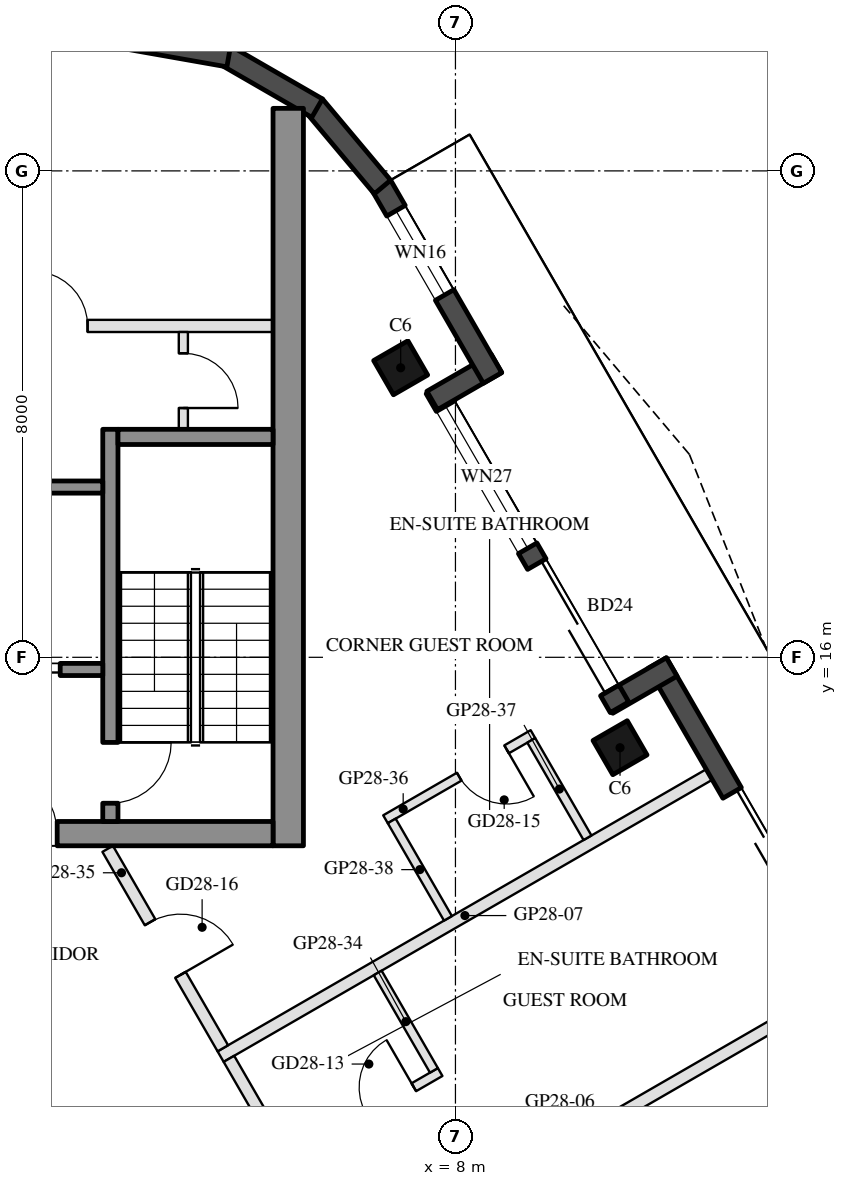
"""IFC4 building model, lengths in metres.
Left out: names, types, materials, properties, quantities, classifications, styles, units other than length and angle.
Written with IfcOpenShell. Run it as: python <this file> out.ifc"""

import sys

from ifc_helpers import new_model, si_unit, direction, frame, frame_2d, origin, origin_2d, place, context, subcontext, project, spatial, rectangle, hollow_rectangle, extrude, boolean, halfspace, element, fill, save


model = new_model("IFC4")
c1 = context("Model", 3, precision=1e-05, world=origin(), true_north=direction((0.0, 1.0)))
c2 = subcontext(c1, "Body", "Model", "MODEL_VIEW")
j1 = project(units=[si_unit("LENGTHUNIT", "METRE"), si_unit("PLANEANGLEUNIT", "RADIAN")], contexts=[c1])
p1 = place(None, origin())
s1 = spatial("IfcSite", under=j1, at=p1, CompositionType="ELEMENT")
p2 = place(p1, origin())
s2 = spatial("IfcBuilding", under=s1, at=p2, CompositionType="ELEMENT")
p3 = place(p2, frame((0.0, 0.0, 280.0)))
s3 = spatial("IfcBuildingStorey", under=s2, at=p3, CompositionType="ELEMENT", Elevation=280.0)
p4 = place(p3, frame((10.707, 14.513, 0.0), z_axis=(0.0, 0.0, 1.0), x_axis=(-0.5, 0.866025403784, 0.0)))
e1 = element("IfcColumn", 1, at=p4, inside=s3, PredefinedType="COLUMN", context=c2, shape_type="SweptSolid", body=[
    boolean("DIFFERENCE", extrude(hollow_rectangle(XDim=0.65, YDim=0.65, WallThickness=0.03, at=origin_2d()), origin(), (0.0, 0.0, 1.0), 3.7), halfspace(frame((0.0, 0.0, 0.04), z_axis=(0.0, 0.0, 1.0), x_axis=(1.0, 0.0, 0.0)), True)),
])
p5 = place(p3, frame((7.099, 20.762, 0.0), z_axis=(0.0, 0.0, 1.0), x_axis=(-0.5, 0.866025403784, 0.0)))
e2 = element("IfcColumn", 2, at=p5, inside=s3, PredefinedType="COLUMN", context=c2, shape_type="SweptSolid", body=[
    boolean("DIFFERENCE", extrude(hollow_rectangle(XDim=0.65, YDim=0.65, WallThickness=0.03, at=origin_2d()), origin(), (0.0, 0.0, 1.0), 3.7), halfspace(frame((0.0, 0.0, 0.047), z_axis=(0.0, 0.0, 1.0), x_axis=(1.0, 0.0, 0.0)), True)),
])
p6 = place(p3, frame((15.825, 8.097, 0.0), z_axis=(0.0, 0.0, 1.0), x_axis=(-0.500006872736, 0.866021435772, 0.0)))
e3 = element("IfcWall", 3, at=p6, inside=s3, PredefinedType="SOLIDWALL", context=c2, shape_type="SweptSolid", body=[
    extrude(rectangle(XDim=9.015, YDim=0.35, at=frame_2d((4.508, 0.0))), origin(), (0.0, 0.0, 1.0), 3.55),
])
p7 = place(p6, frame((1.575, 0.0, 0.3)))
e4 = element("IfcOpeningElement", 4, at=p7, cuts=e3, PredefinedType="OPENING", context=c2, shape_type="SweptSolid", body=[
    extrude(rectangle(XDim=0.8, YDim=2.65, at=frame_2d((0.4, 1.325))), frame((0.0, 0.185, 0.0), z_axis=(0.0, -1.0, 0.0), x_axis=(1.0, 0.0, 0.0)), (0.0, 0.0, 1.0), 0.37),
])
p8 = place(p6, frame((4.75, 0.0, 0.0)))
e5 = element("IfcOpeningElement", 5, at=p8, cuts=e3, PredefinedType="OPENING", context=c2, shape_type="SweptSolid", body=[
    extrude(rectangle(XDim=1.8, YDim=2.4, at=frame_2d((0.9, 1.2))), frame((0.0, 0.185, 0.0), z_axis=(0.0, -1.0, 0.0), x_axis=(1.0, 0.0, 0.0)), (0.0, 0.0, 1.0), 0.37),
])
p9 = place(p6, frame((3.35, 0.0, 0.3)))
e6 = element("IfcOpeningElement", 6, at=p9, cuts=e3, PredefinedType="OPENING", context=c2, shape_type="SweptSolid", body=[
    extrude(rectangle(XDim=1.0, YDim=2.65, at=frame_2d((0.5, 1.325))), frame((0.0, 0.185, 0.0), z_axis=(0.0, -1.0, 0.0), x_axis=(1.0, 0.0, 0.0)), (0.0, 0.0, 1.0), 0.37),
])
p10 = place(p3, frame((11.557, 15.841, 0.0), z_axis=(0.0, 0.0, 1.0), x_axis=(-0.866005645448, -0.500034220881, 0.0)))
e7 = element("IfcWall", 7, at=p10, inside=s3, PredefinedType="SOLIDWALL", context=c2, shape_type="SweptSolid", body=[
    extrude(rectangle(XDim=1.22, YDim=0.35, at=frame_2d((0.61, 0.0))), origin(), (0.0, 0.0, 1.0), 3.55),
])
p11 = place(p3, frame((10.698, 15.178, 0.0), z_axis=(0.0, 0.0, 1.0), x_axis=(-0.499985371027, 0.866033849661, 0.0)))
e8 = element("IfcWall", 8, at=p11, inside=s3, PredefinedType="SOLIDWALL", context=c2, shape_type="SweptSolid", body=[
    extrude(rectangle(XDim=6.055, YDim=0.35, at=frame_2d((3.028, 0.0))), origin(), (0.0, 0.0, 1.0), 3.55),
])
p12 = place(p11, frame((0.32, 0.0, 0.0)))
e9 = element("IfcOpeningElement", 9, at=p12, cuts=e8, PredefinedType="OPENING", context=c2, shape_type="SweptSolid", body=[
    extrude(rectangle(XDim=2.4, YDim=2.4, at=frame_2d((1.2, 1.2))), frame((0.0, 0.185, 0.0), z_axis=(0.0, -1.0, 0.0), x_axis=(1.0, 0.0, 0.0)), (0.0, 0.0, 1.0), 0.37),
])
p13 = place(p11, frame((3.02, 0.0, 0.3)))
e10 = element("IfcOpeningElement", 10, at=p13, cuts=e8, PredefinedType="OPENING", context=c2, shape_type="SweptSolid", body=[
    extrude(rectangle(XDim=2.7, YDim=2.65, at=frame_2d((1.35, 1.325))), frame((0.0, 0.185, 0.0), z_axis=(0.0, -1.0, 0.0), x_axis=(1.0, 0.0, 0.0)), (0.0, 0.0, 1.0), 0.37),
])
p14 = place(p3, frame((7.617, 20.224, 0.0), z_axis=(0.0, 0.0, 1.0), x_axis=(0.866005645448, 0.500034220881, 0.0)))
e11 = element("IfcWall", 11, at=p14, inside=s3, PredefinedType="SOLIDWALL", context=c2, shape_type="SweptSolid", body=[
    extrude(rectangle(XDim=1.22, YDim=0.35, at=frame_2d((0.61, 0.0))), origin(), (0.0, 0.0, 1.0), 3.55),
])
p15 = place(p3, frame((8.61, 20.595, 0.0), z_axis=(0.0, 0.0, 1.0), x_axis=(-0.499990402704, 0.866030944715, 0.0)))
e12 = element("IfcWall", 12, at=p15, inside=s3, PredefinedType="SOLIDWALL", context=c2, shape_type="SweptSolid", body=[
    extrude(rectangle(XDim=3.654, YDim=0.35, at=frame_2d((1.827, 0.0))), origin(), (0.0, 0.0, 1.0), 3.55),
])
p16 = place(p15, frame((1.575, 0.0, 0.3)))
e13 = element("IfcOpeningElement", 13, at=p16, cuts=e12, PredefinedType="OPENING", context=c2, shape_type="SweptSolid", body=[
    extrude(rectangle(XDim=1.6, YDim=2.65, at=frame_2d((0.8, 1.325))), frame((0.0, 0.185, 0.0), z_axis=(0.0, -1.0, 0.0), x_axis=(1.0, 0.0, 0.0)), (0.0, 0.0, 1.0), 0.37),
])
for number, where, z_axis, x_axis in (
    (14, (6.8, 23.735, 0.0), (0.0, 0.0, 1.0), (-0.643, 0.766, 0.0)),
    (15, (5.725, 25.032, 0.0), (0.0, 0.0, 1.0), (-0.866, 0.5, 0.0)),
    (16, (4.271, 25.884, 0.0), (0.0, 0.0, 1.0), (-0.985, 0.174, 0.0)),
):
    element("IfcWall", number, at=place(p3, frame(where, z_axis=z_axis, x_axis=x_axis)), inside=s3, PredefinedType="SOLIDWALL", context=c2, shape_type="SweptSolid", body=[
        extrude(rectangle(XDim=1.745, YDim=0.35, at=frame_2d((0.872, 0.0))), origin(), (0.0, 0.0, 1.0), 3.55),
    ])
p17 = place(p3, frame((5.25, 12.9, 0.0), z_axis=(0.0, 0.0, 1.0), x_axis=(0.0, 1.0, 0.0)))
e17 = element("IfcWall", 17, at=p17, inside=s3, PredefinedType="SHEAR", context=c2, shape_type="SweptSolid", body=[
    extrude(rectangle(XDim=12.129, YDim=0.5, at=frame_2d((6.064, 0.0))), origin(), (0.0, 0.0, 1.0), 3.5),
])
p18 = place(p3, frame((5.0, 13.1, 0.0), z_axis=(0.0, 0.0, 1.0), x_axis=(-1.0, 0.0, 0.0)))
e18 = element("IfcWall", 18, at=p18, inside=s3, PredefinedType="SHEAR", context=c2, shape_type="SweptSolid", body=[
    extrude(rectangle(XDim=10.0, YDim=0.4, at=frame_2d((5.0, 0.0))), origin(), (0.0, 0.0, 1.0), 3.5),
])
p19 = place(p18, frame((3.55, 0.0, 0.0)))
e19 = element("IfcOpeningElement", 19, at=p19, cuts=e18, PredefinedType="OPENING", context=c2, shape_type="SweptSolid", body=[
    extrude(rectangle(XDim=1.1, YDim=2.1, at=frame_2d((0.55, 1.05))), frame((0.0, 0.21, 0.0), z_axis=(0.0, -1.0, 0.0), x_axis=(1.0, 0.0, 0.0)), (0.0, 0.0, 1.0), 0.42),
])
p20 = place(p18, frame((5.85, 0.0, 0.0)))
e20 = element("IfcOpeningElement", 20, at=p20, cuts=e18, PredefinedType="OPENING", context=c2, shape_type="SweptSolid", body=[
    extrude(rectangle(XDim=1.4, YDim=2.1, at=frame_2d((0.7, 1.05))), frame((0.0, 0.21, 0.0), z_axis=(0.0, -1.0, 0.0), x_axis=(1.0, 0.0, 0.0)), (0.0, 0.0, 1.0), 0.42),
])
p21 = place(p3, frame((2.325, 13.3, 0.0), z_axis=(0.0, 0.0, 1.0), x_axis=(0.0, 1.0, 0.0)))
e21 = element("IfcWall", 21, at=p21, inside=s3, PredefinedType="SHEAR", context=c2, shape_type="SweptSolid", body=[
    extrude(rectangle(XDim=6.45, YDim=0.25, at=frame_2d((3.225, 0.0))), origin(), (0.0, 0.0, 1.0), 3.5),
])
p22 = place(p21, frame((0.3, 0.0, 0.0)))
e22 = element("IfcOpeningElement", 22, at=p22, cuts=e21, PredefinedType="OPENING", context=c2, shape_type="SweptSolid", body=[
    extrude(rectangle(XDim=1.0, YDim=2.1, at=frame_2d((0.5, 1.05))), frame((0.0, 0.135, 0.0), z_axis=(0.0, -1.0, 0.0), x_axis=(1.0, 0.0, 0.0)), (0.0, 0.0, 1.0), 0.27),
])
p23 = place(p3, frame((5.0, 19.625, 0.0), z_axis=(0.0, 0.0, 1.0), x_axis=(-1.0, 0.0, 0.0)))
e23 = element("IfcWall", 23, at=p23, inside=s3, PredefinedType="SHEAR", context=c2, shape_type="SweptSolid", body=[
    extrude(rectangle(XDim=2.55, YDim=0.25, at=frame_2d((1.275, 0.0))), origin(), (0.0, 0.0, 1.0), 3.5),
])
p24 = place(p3, frame((2.2, 18.8, 0.0), z_axis=(0.0, 0.0, 1.0), x_axis=(-1.0, 0.0, 0.0)))
e24 = element("IfcWall", 24, at=p24, inside=s3, PredefinedType="SHEAR", context=c2, shape_type="SweptSolid", body=[
    extrude(rectangle(XDim=2.8, YDim=0.2, at=frame_2d((1.4, 0.0))), origin(), (0.0, 0.0, 1.0), 3.5),
])
p25 = place(p3, frame((2.2, 15.8, 0.0), z_axis=(0.0, 0.0, 1.0), x_axis=(-1.0, 0.0, 0.0)))
e25 = element("IfcWall", 25, at=p25, inside=s3, PredefinedType="SHEAR", context=c2, shape_type="SweptSolid", body=[
    extrude(rectangle(XDim=2.8, YDim=0.2, at=frame_2d((1.4, 0.0))), origin(), (0.0, 0.0, 1.0), 3.5),
])
p26 = place(p25, frame((0.7, 0.0, 0.0)))
e26 = element("IfcOpeningElement", 26, at=p26, cuts=e25, PredefinedType="OPENING", context=c2, shape_type="SweptSolid", body=[
    extrude(rectangle(XDim=1.2, YDim=2.1, at=frame_2d((0.6, 1.05))), frame((0.0, 0.11, 0.0), z_axis=(0.0, -1.0, 0.0), x_axis=(1.0, 0.0, 0.0)), (0.0, 0.0, 1.0), 0.22),
])
p27 = place(p3, frame((5.0, 21.45, 0.0), z_axis=(0.0, 0.0, 1.0), x_axis=(-1.0, 0.0, 0.0)))
e27 = element("IfcWall", 27, at=p27, inside=s3, PredefinedType="PARTITIONING", context=c2, shape_type="SweptSolid", body=[
    extrude(rectangle(XDim=5.4, YDim=0.2, at=frame_2d((2.7, 0.0))), origin(), (0.0, 0.0, 1.0), 3.5),
])
p28 = place(p27, frame((3.05, 0.0, 0.0)))
e28 = element("IfcOpeningElement", 28, at=p28, cuts=e27, PredefinedType="OPENING", context=c2, shape_type="SweptSolid", body=[
    extrude(rectangle(XDim=0.9, YDim=2.1, at=frame_2d((0.45, 1.05))), frame((0.0, 0.11, 0.0), z_axis=(0.0, -1.0, 0.0), x_axis=(1.0, 0.0, 0.0)), (0.0, 0.0, 1.0), 0.22),
])
p29 = place(p3, frame((3.525, 19.75, 0.0), z_axis=(0.0, 0.0, 1.0), x_axis=(0.0, 1.0, 0.0)))
e29 = element("IfcWall", 29, at=p29, inside=s3, PredefinedType="PARTITIONING", context=c2, shape_type="SweptSolid", body=[
    extrude(rectangle(XDim=1.6, YDim=0.15, at=frame_2d((0.8, 0.0))), origin(), (0.0, 0.0, 1.0), 3.5),
])
p30 = place(p29, frame((0.35, 0.0, 0.0)))
e30 = element("IfcOpeningElement", 30, at=p30, cuts=e29, PredefinedType="OPENING", context=c2, shape_type="SweptSolid", body=[
    extrude(rectangle(XDim=0.9, YDim=2.1, at=frame_2d((0.45, 1.05))), frame((0.0, 0.085, 0.0), z_axis=(0.0, -1.0, 0.0), x_axis=(1.0, 0.0, 0.0)), (0.0, 0.0, 1.0), 0.17),
])
p31 = place(p3, frame((14.224, 10.521, 0.0), z_axis=(0.0, 0.0, 1.0), x_axis=(-0.866024341471, -0.500001839976, 0.0)))
e31 = element("IfcWall", 31, at=p31, inside=s3, PredefinedType="PARTITIONING", context=c2, shape_type="SweptSolid", body=[
    extrude(rectangle(XDim=9.279, YDim=0.2, at=frame_2d((4.639, 0.0))), origin(), (0.0, 0.0, 1.0), 3.16),
])
p32 = place(p3, frame((12.174, 14.072, 0.0), z_axis=(0.0, 0.0, 1.0), x_axis=(-0.866035734738, -0.499982105836, 0.0)))
e32 = element("IfcWall", 32, at=p32, inside=s3, PredefinedType="PARTITIONING", context=c2, shape_type="SweptSolid", body=[
    extrude(rectangle(XDim=9.279, YDim=0.2, at=frame_2d((4.639, 0.0))), origin(), (0.0, 0.0, 1.0), 3.16),
])
p33 = place(p3, frame((4.275, 9.396, 0.0), z_axis=(0.0, 0.0, 1.0), x_axis=(0.499997012787, -0.866027128446, 0.0)))
e33 = element("IfcWall", 33, at=p33, inside=s3, PredefinedType="PARTITIONING", context=c2, shape_type="SweptSolid", body=[
    extrude(rectangle(XDim=3.9, YDim=0.2, at=frame_2d((1.95, 0.0))), origin(), (0.0, 0.0, 1.0), 3.05),
])
p34 = place(p33, frame((2.45, 0.0, 0.0)))
e34 = element("IfcOpeningElement", 34, at=p34, cuts=e33, PredefinedType="OPENING", context=c2, shape_type="SweptSolid", body=[
    extrude(rectangle(XDim=1.0, YDim=2.1, at=frame_2d((0.5, 1.05))), frame((0.0, 0.11, 0.0), z_axis=(0.0, -1.0, 0.0), x_axis=(1.0, 0.0, 0.0)), (0.0, 0.0, 1.0), 0.22),
])
p35 = place(p3, frame((5.324, 7.779, 0.0), z_axis=(0.0, 0.0, 1.0), x_axis=(0.865996816683, 0.500049511043, 0.0)))
e35 = element("IfcWall", 35, at=p35, inside=s3, PredefinedType="PARTITIONING", context=c2, shape_type="SweptSolid", body=[
    extrude(rectangle(XDim=2.8, YDim=0.15, at=frame_2d((1.4, 0.0))), origin(), (0.0, 0.0, 1.0), 3.55),
])
p36 = place(p35, frame((1.4, 0.0, 0.0)))
e36 = element("IfcOpeningElement", 36, at=p36, cuts=e35, PredefinedType="OPENING", context=c2, shape_type="SweptSolid", body=[
    extrude(rectangle(XDim=0.9, YDim=2.1, at=frame_2d((0.45, 1.05))), frame((0.0, 0.085, 0.0), z_axis=(0.0, -1.0, 0.0), x_axis=(1.0, 0.0, 0.0)), (0.0, 0.0, 1.0), 0.17),
])
p37 = place(p3, frame((7.646, 9.207, 0.0), z_axis=(0.0, 0.0, 1.0), x_axis=(-0.49994333299, 0.866058118026, 0.0)))
e37 = element("IfcWall", 37, at=p37, inside=s3, PredefinedType="PARTITIONING", context=c2, shape_type="SweptSolid", body=[
    extrude(rectangle(XDim=1.85, YDim=0.15, at=frame_2d((0.925, 0.0))), origin(), (0.0, 0.0, 1.0), 3.55),
])
p38 = place(p3, frame((2.281, 12.85, 0.0), z_axis=(0.0, 0.0, 1.0), x_axis=(0.499979074716, -0.866037484666, 0.0)))
e38 = element("IfcWall", 38, at=p38, inside=s3, PredefinedType="PARTITIONING", context=c2, shape_type="SweptSolid", body=[
    extrude(rectangle(XDim=3.788, YDim=0.2, at=frame_2d((1.894, 0.0))), origin(), (0.0, 0.0, 1.0), 3.05),
])
p39 = place(p38, frame((1.394, 0.0, 0.0)))
e39 = element("IfcOpeningElement", 39, at=p39, cuts=e38, PredefinedType="OPENING", context=c2, shape_type="SweptSolid", body=[
    extrude(rectangle(XDim=1.0, YDim=2.1, at=frame_2d((0.5, 1.05))), frame((0.0, 0.11, 0.0), z_axis=(0.0, -1.0, 0.0), x_axis=(1.0, 0.0, 0.0)), (0.0, 0.0, 1.0), 0.22),
])
p40 = place(p3, frame((9.274, 14.737, 0.0), z_axis=(0.0, 0.0, 1.0), x_axis=(-0.866018616679, -0.500011755427, 0.0)))
e40 = element("IfcWall", 40, at=p40, inside=s3, PredefinedType="PARTITIONING", context=c2, shape_type="SweptSolid", body=[
    extrude(rectangle(XDim=2.8, YDim=0.15, at=frame_2d((1.4, 0.0))), origin(), (0.0, 0.0, 1.0), 3.55),
])
p41 = place(p40, frame((0.5, 0.0, 0.0)))
e41 = element("IfcOpeningElement", 41, at=p41, cuts=e40, PredefinedType="OPENING", context=c2, shape_type="SweptSolid", body=[
    extrude(rectangle(XDim=0.9, YDim=2.1, at=frame_2d((0.45, 1.05))), frame((0.0, 0.085, 0.0), z_axis=(0.0, -1.0, 0.0), x_axis=(1.0, 0.0, 0.0)), (0.0, 0.0, 1.0), 0.17),
])
p42 = place(p3, frame((10.172, 13.032, 0.0), z_axis=(0.0, 0.0, 1.0), x_axis=(-0.500042316284, 0.866000971088, 0.0)))
e42 = element("IfcWall", 42, at=p42, inside=s3, PredefinedType="PARTITIONING", context=c2, shape_type="SweptSolid", body=[
    extrude(rectangle(XDim=1.85, YDim=0.15, at=frame_2d((0.925, 0.0))), origin(), (0.0, 0.0, 1.0), 3.05),
])
p43 = place(p3, frame((7.877, 11.707, 0.0), z_axis=(0.0, 0.0, 1.0), x_axis=(-0.499985172903, 0.866033964044, 0.0)))
e43 = element("IfcWall", 43, at=p43, inside=s3, PredefinedType="PARTITIONING", context=c2, shape_type="SweptSolid", body=[
    extrude(rectangle(XDim=1.85, YDim=0.15, at=frame_2d((0.925, 0.0))), origin(), (0.0, 0.0, 1.0), 3.05),
])
p44 = place(p8, frame((1.8, 0.0, 0.0), z_axis=(0.0, 0.0, 1.0), x_axis=(-1.0, 0.0, 0.0)))
e44 = element("IfcDoor", 44, at=p44, inside=s3, OperationType="SLIDING_TO_LEFT", PredefinedType="DOOR", context=c2, shape_type="SweptSolid", body=[
    extrude(rectangle(XDim=1.8, YDim=2.4, at=frame_2d((0.9, 1.2))), frame((0.0, 0.025, 0.0), z_axis=(0.0, -1.0, 0.0), x_axis=(1.0, 0.0, 0.0)), (0.0, 0.0, 1.0), 0.05),
])
fill(e5, e44)
p45 = place(p12, frame((2.4, 0.0, 0.0), z_axis=(0.0, 0.0, 1.0), x_axis=(-1.0, 0.0, 0.0)))
e45 = element("IfcDoor", 45, at=p45, inside=s3, OperationType="SLIDING_TO_LEFT", PredefinedType="DOOR", context=c2, shape_type="SweptSolid", body=[
    extrude(rectangle(XDim=2.4, YDim=2.4, at=frame_2d((1.2, 1.2))), frame((0.0, 0.025, 0.0), z_axis=(0.0, -1.0, 0.0), x_axis=(1.0, 0.0, 0.0)), (0.0, 0.0, 1.0), 0.05),
])
fill(e9, e45)
p46 = place(p13, origin())
e46 = element("IfcWindow", 46, at=p46, inside=s3, PartitioningType="SINGLE_PANEL", PredefinedType="WINDOW", context=c2, shape_type="SweptSolid", body=[
    extrude(rectangle(XDim=2.7, YDim=2.65, at=frame_2d((1.35, 1.325))), frame((0.0, 0.03, 0.0), z_axis=(0.0, -1.0, 0.0), x_axis=(1.0, 0.0, 0.0)), (0.0, 0.0, 1.0), 0.06),
])
fill(e10, e46)
p47 = place(p16, origin())
e47 = element("IfcWindow", 47, at=p47, inside=s3, PartitioningType="SINGLE_PANEL", PredefinedType="WINDOW", context=c2, shape_type="SweptSolid", body=[
    extrude(rectangle(XDim=1.6, YDim=2.65, at=frame_2d((0.8, 1.325))), frame((0.0, 0.03, 0.0), z_axis=(0.0, -1.0, 0.0), x_axis=(1.0, 0.0, 0.0)), (0.0, 0.0, 1.0), 0.06),
])
fill(e13, e47)
p48 = place(p26, origin())
e48 = element("IfcDoor", 48, at=p48, inside=s3, OperationType="DOUBLE_DOOR_SLIDING", PredefinedType="DOOR", context=c2, shape_type="SweptSolid", body=[
    extrude(rectangle(XDim=1.2, YDim=2.1, at=frame_2d((0.6, 1.05))), frame((0.0, 0.025, 0.0), z_axis=(0.0, -1.0, 0.0), x_axis=(1.0, 0.0, 0.0)), (0.0, 0.0, 1.0), 0.05),
])
fill(e26, e48)
p49 = place(p30, frame((0.9, 0.0, 0.0), z_axis=(0.0, 0.0, 1.0), x_axis=(-1.0, 0.0, 0.0)))
e49 = element("IfcDoor", 49, at=p49, inside=s3, OperationType="SINGLE_SWING_RIGHT", PredefinedType="DOOR", context=c2, shape_type="SweptSolid", body=[
    extrude(rectangle(XDim=0.9, YDim=2.1, at=frame_2d((0.45, 1.05))), frame((0.0, 0.025, 0.0), z_axis=(0.0, -1.0, 0.0), x_axis=(1.0, 0.0, 0.0)), (0.0, 0.0, 1.0), 0.05),
])
fill(e30, e49)
p50 = place(p28, frame((0.9, 0.0, 0.0), z_axis=(0.0, 0.0, 1.0), x_axis=(-1.0, 0.0, 0.0)))
e50 = element("IfcDoor", 50, at=p50, inside=s3, OperationType="SINGLE_SWING_LEFT", PredefinedType="DOOR", context=c2, shape_type="SweptSolid", body=[
    extrude(rectangle(XDim=0.9, YDim=2.1, at=frame_2d((0.45, 1.05))), frame((0.0, 0.025, 0.0), z_axis=(0.0, -1.0, 0.0), x_axis=(1.0, 0.0, 0.0)), (0.0, 0.0, 1.0), 0.05),
])
fill(e28, e50)
p51 = place(p19, frame((1.1, 0.0, 0.0), z_axis=(0.0, 0.0, 1.0), x_axis=(-1.0, 0.0, 0.0)))
e51 = element("IfcDoor", 51, at=p51, inside=s3, OperationType="SINGLE_SWING_LEFT", PredefinedType="DOOR", context=c2, shape_type="SweptSolid", body=[
    extrude(rectangle(XDim=1.1, YDim=2.1, at=frame_2d((0.55, 1.05))), frame((0.0, 0.025, 0.0), z_axis=(0.0, -1.0, 0.0), x_axis=(1.0, 0.0, 0.0)), (0.0, 0.0, 1.0), 0.05),
])
fill(e19, e51)
p52 = place(p22, frame((1.0, 0.0, 0.0), z_axis=(0.0, 0.0, 1.0), x_axis=(-1.0, 0.0, 0.0)))
e52 = element("IfcDoor", 52, at=p52, inside=s3, OperationType="SINGLE_SWING_LEFT", PredefinedType="DOOR", context=c2, shape_type="SweptSolid", body=[
    extrude(rectangle(XDim=1.0, YDim=2.1, at=frame_2d((0.5, 1.05))), frame((0.0, 0.025, 0.0), z_axis=(0.0, -1.0, 0.0), x_axis=(1.0, 0.0, 0.0)), (0.0, 0.0, 1.0), 0.05),
])
fill(e22, e52)
p53 = place(p36, origin())
e53 = element("IfcDoor", 53, at=p53, inside=s3, OperationType="SINGLE_SWING_RIGHT", PredefinedType="DOOR", context=c2, shape_type="SweptSolid", body=[
    extrude(rectangle(XDim=0.9, YDim=2.1, at=frame_2d((0.45, 1.05))), frame((0.0, 0.025, 0.0), z_axis=(0.0, -1.0, 0.0), x_axis=(1.0, 0.0, 0.0)), (0.0, 0.0, 1.0), 0.05),
])
fill(e36, e53)
p54 = place(p41, origin())
e54 = element("IfcDoor", 54, at=p54, inside=s3, OperationType="SINGLE_SWING_LEFT", PredefinedType="DOOR", context=c2, shape_type="SweptSolid", body=[
    extrude(rectangle(XDim=0.9, YDim=2.1, at=frame_2d((0.45, 1.05))), frame((0.0, 0.025, 0.0), z_axis=(0.0, -1.0, 0.0), x_axis=(1.0, 0.0, 0.0)), (0.0, 0.0, 1.0), 0.05),
])
fill(e41, e54)
p55 = place(p39, origin())
e55 = element("IfcDoor", 55, at=p55, inside=s3, OperationType="SINGLE_SWING_RIGHT", PredefinedType="DOOR", context=c2, shape_type="SweptSolid", body=[
    extrude(rectangle(XDim=1.0, YDim=2.1, at=frame_2d((0.5, 1.05))), frame((0.0, 0.025, 0.0), z_axis=(0.0, -1.0, 0.0), x_axis=(1.0, 0.0, 0.0)), (0.0, 0.0, 1.0), 0.05),
])
fill(e39, e55)
save(model, sys.argv[1])
